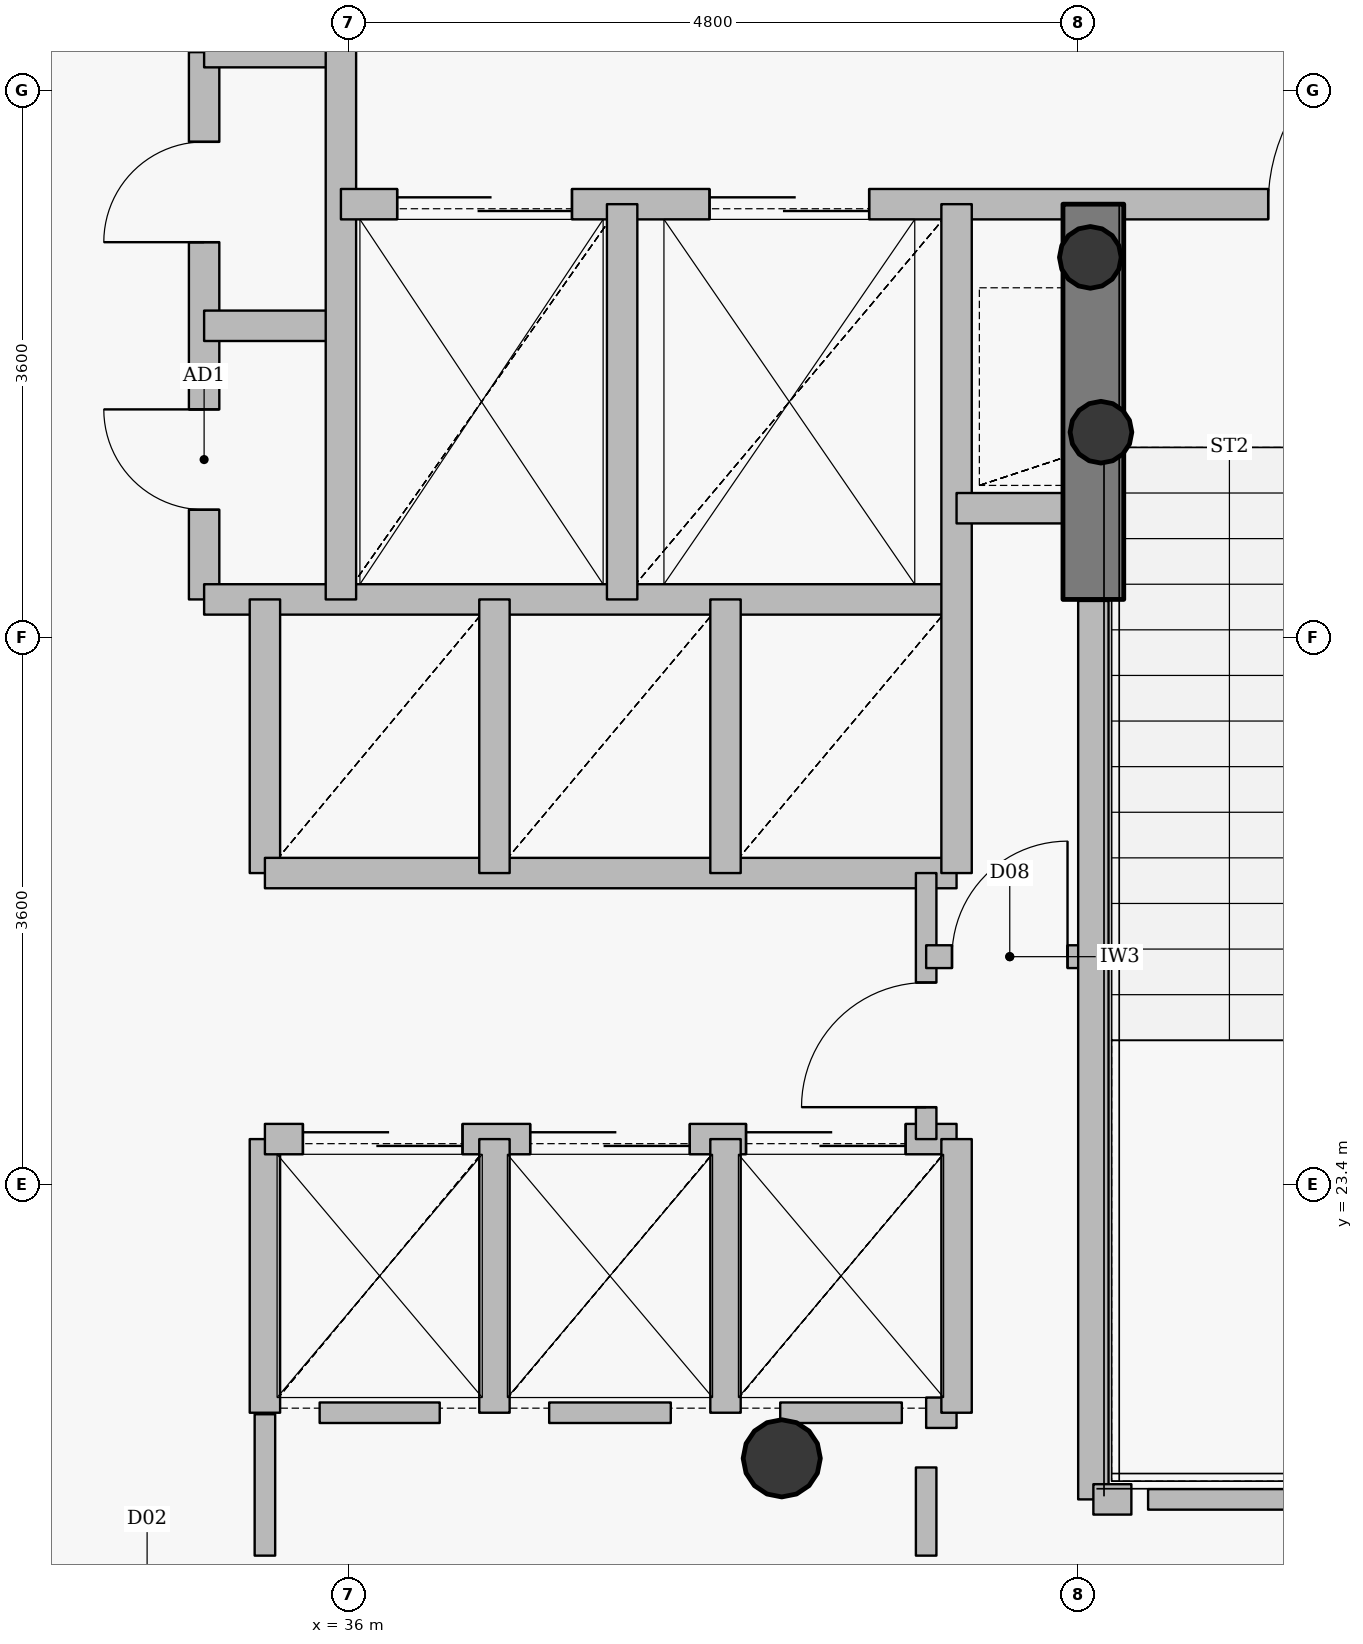
"""IFC4 building model, lengths in metres.
Left out: names, types, materials, properties, quantities, classifications, styles, units other than length and angle.
Written with IfcOpenShell. Run it as: python <this file> out.ifc"""

import sys

from ifc_helpers import new_model, si_unit, direction, frame, frame_2d, origin, origin_2d, place, context, subcontext, project, spatial, rectangle, hollow_circle, extrude, source, transform, mapped, element, fill, save


model = new_model("IFC4")
c1 = context("Model", 3, precision=1e-05, world=origin(), true_north=direction((0.0, 1.0)))
c2 = subcontext(c1, "Body", "Model", "MODEL_VIEW")
j1 = project(units=[si_unit("LENGTHUNIT", "METRE"), si_unit("PLANEANGLEUNIT", "RADIAN")], contexts=[c1])
p1 = place(None, origin())
s1 = spatial("IfcSite", under=j1, at=p1, CompositionType="ELEMENT")
p2 = place(p1, origin())
s2 = spatial("IfcBuilding", under=s1, at=p2, CompositionType="ELEMENT")
p3 = place(p2, frame((0.0, 0.0, 66.0)))
s3 = spatial("IfcBuildingStorey", under=s2, at=p3, CompositionType="ELEMENT", Elevation=66.0)
p4 = place(p3, frame((38.85, 21.6, 0.0), z_axis=(0.0, 0.0, 1.0), x_axis=(1.0, 0.0, 0.0)))
e1 = element("IfcColumn", 1, at=p4, inside=s3, PredefinedType="COLUMN", context=c2, shape_type="SweptSolid", body=[
    extrude(hollow_circle(Radius=0.254, WallThickness=0.02, at=origin_2d()), origin(), (0.0, 0.0, 1.0), 4.2),
])
for number, where, z_axis, x_axis in (
    (2, (40.95, 28.35, 0.0), (0.0, 0.0, 1.0), (1.0, 0.0, 0.0)),
    (3, (40.88, 29.5, 0.0), (0.0, 0.0, 1.0), (1.0, 0.0, 0.0)),
):
    element("IfcColumn", number, at=place(p3, frame(where, z_axis=z_axis, x_axis=x_axis)), inside=s3, PredefinedType="COLUMN", context=c2, shape_type="SweptSolid", body=[
        extrude(hollow_circle(Radius=0.203, WallThickness=0.016, at=origin_2d()), origin(), (0.0, 0.0, 1.0), 4.2),
    ])
p5 = place(p3, frame((40.9, 27.25, 0.0), z_axis=(0.0, 0.0, 1.0), x_axis=(0.0, 1.0, 0.0)))
e4 = element("IfcWall", 4, at=p5, inside=s3, PredefinedType="SHEAR", context=c2, shape_type="SweptSolid", body=[
    extrude(rectangle(XDim=2.6, YDim=0.4, at=frame_2d((1.3, 0.0))), origin(), (0.0, 0.0, 1.0), 3.55),
])
p6 = place(p3, frame((35.05, 27.25, 0.0), z_axis=(0.0, 0.0, 1.0), x_axis=(0.0, 1.0, 0.0)))
e5 = element("IfcWall", 5, at=p6, inside=s3, PredefinedType="PARTITIONING", context=c2, shape_type="SweptSolid", body=[
    extrude(rectangle(XDim=3.6, YDim=0.2, at=frame_2d((1.8, 0.0))), origin(), (0.0, 0.0, 1.0), 3.95),
])
p7 = place(p6, frame((0.59, 0.0, 0.0)))
e6 = element("IfcOpeningElement", 6, at=p7, cuts=e5, PredefinedType="OPENING", context=c2, shape_type="SweptSolid", body=[
    extrude(rectangle(XDim=0.66, YDim=2.05, at=origin_2d()), frame((0.33, 0.11, 1.025), z_axis=(0.0, -1.0, 0.0), x_axis=(1.0, 0.0, 0.0)), (0.0, 0.0, 1.0), 0.22),
])
p8 = place(p6, frame((2.35, 0.0, 0.0)))
e7 = element("IfcOpeningElement", 7, at=p8, cuts=e5, PredefinedType="OPENING", context=c2, shape_type="SweptSolid", body=[
    extrude(rectangle(XDim=0.66, YDim=2.05, at=origin_2d()), frame((0.33, 0.11, 1.025), z_axis=(0.0, -1.0, 0.0), x_axis=(1.0, 0.0, 0.0)), (0.0, 0.0, 1.0), 0.22),
])
p9 = place(p3, frame((35.05, 27.25, 0.0), z_axis=(0.0, 0.0, 1.0), x_axis=(1.0, 0.0, 0.0)))
e8 = element("IfcWall", 8, at=p9, inside=s3, PredefinedType="PARTITIONING", context=c2, shape_type="SweptSolid", body=[
    extrude(rectangle(XDim=4.95, YDim=0.2, at=frame_2d((2.475, 0.0))), origin(), (0.0, 0.0, 1.0), 3.535),
])
for number, where, z_axis, x_axis in (
    (9, (35.05, 29.05, 0.0), (0.0, 0.0, 1.0), (1.0, 0.0, 0.0)),
    (10, (35.05, 30.85, 0.0), (0.0, 0.0, 1.0), (1.0, 0.0, 0.0)),
):
    element("IfcWall", number, at=place(p3, frame(where, z_axis=z_axis, x_axis=x_axis)), inside=s3, PredefinedType="PARTITIONING", context=c2, shape_type="SweptSolid", body=[
        extrude(rectangle(XDim=0.9, YDim=0.2, at=frame_2d((0.45, 0.0))), origin(), (0.0, 0.0, 1.0), 3.95),
    ])
p10 = place(p3, frame((35.45, 21.9, 0.0), z_axis=(0.0, 0.0, 1.0), x_axis=(0.0, 1.0, 0.0)))
e11 = element("IfcWall", 11, at=p10, inside=s3, PredefinedType="PARTITIONING", context=c2, shape_type="SweptSolid", body=[
    extrude(rectangle(XDim=1.8, YDim=0.2, at=frame_2d((0.9, 0.0))), origin(), (0.0, 0.0, 1.0), 3.95),
])
p11 = place(p3, frame((35.45, 23.7, 0.0), z_axis=(0.0, 0.0, 1.0), x_axis=(1.0, 0.0, 0.0)))
e12 = element("IfcWall", 12, at=p11, inside=s3, PredefinedType="PARTITIONING", context=c2, shape_type="SweptSolid", body=[
    extrude(rectangle(XDim=4.55, YDim=0.2, at=frame_2d((2.275, 0.0))), origin(), (0.0, 0.0, 1.0), 3.535),
])
p12 = place(p11, frame((0.25, 0.0, 0.0)))
e13 = element("IfcOpeningElement", 13, at=p12, cuts=e12, PredefinedType="OPENING", context=c2, shape_type="SweptSolid", body=[
    extrude(rectangle(XDim=1.05, YDim=2.15, at=origin_2d()), frame((0.525, 0.11, 1.075), z_axis=(0.0, -1.0, 0.0), x_axis=(1.0, 0.0, 0.0)), (0.0, 0.0, 1.0), 0.22),
])
p13 = place(p11, frame((1.745, 0.0, 0.0)))
e14 = element("IfcOpeningElement", 14, at=p13, cuts=e12, PredefinedType="OPENING", context=c2, shape_type="SweptSolid", body=[
    extrude(rectangle(XDim=1.05, YDim=2.15, at=origin_2d()), frame((0.525, 0.11, 1.075), z_axis=(0.0, -1.0, 0.0), x_axis=(1.0, 0.0, 0.0)), (0.0, 0.0, 1.0), 0.22),
])
p14 = place(p11, frame((3.165, 0.0, 0.0)))
e15 = element("IfcOpeningElement", 15, at=p14, cuts=e12, PredefinedType="OPENING", context=c2, shape_type="SweptSolid", body=[
    extrude(rectangle(XDim=1.05, YDim=2.15, at=origin_2d()), frame((0.525, 0.11, 1.075), z_axis=(0.0, -1.0, 0.0), x_axis=(1.0, 0.0, 0.0)), (0.0, 0.0, 1.0), 0.22),
])
p15 = place(p3, frame((35.45, 25.45, 0.0), z_axis=(0.0, 0.0, 1.0), x_axis=(0.0, 1.0, 0.0)))
e16 = element("IfcWall", 16, at=p15, inside=s3, PredefinedType="PARTITIONING", context=c2, shape_type="SweptSolid", body=[
    extrude(rectangle(XDim=1.8, YDim=0.2, at=frame_2d((0.9, 0.0))), origin(), (0.0, 0.0, 1.0), 3.95),
])
p16 = place(p3, frame((35.45, 25.45, 0.0), z_axis=(0.0, 0.0, 1.0), x_axis=(1.0, 0.0, 0.0)))
e17 = element("IfcWall", 17, at=p16, inside=s3, PredefinedType="PARTITIONING", context=c2, shape_type="SweptSolid", body=[
    extrude(rectangle(XDim=4.55, YDim=0.2, at=frame_2d((2.275, 0.0))), origin(), (0.0, 0.0, 1.0), 3.535),
])
p17 = place(p3, frame((35.95, 27.25, 0.0), z_axis=(0.0, 0.0, 1.0), x_axis=(0.0, 1.0, 0.0)))
e18 = element("IfcWall", 18, at=p17, inside=s3, PredefinedType="PARTITIONING", context=c2, shape_type="SweptSolid", body=[
    extrude(rectangle(XDim=3.8, YDim=0.2, at=frame_2d((1.9, 0.0))), origin(), (0.0, 0.0, 1.0), 3.95),
])
p18 = place(p3, frame((35.95, 29.85, 0.0), z_axis=(0.0, 0.0, 1.0), x_axis=(1.0, 0.0, 0.0)))
e19 = element("IfcWall", 19, at=p18, inside=s3, PredefinedType="PARTITIONING", context=c2, shape_type="SweptSolid", body=[
    extrude(rectangle(XDim=8.49, YDim=0.2, at=frame_2d((4.245, 0.0))), origin(), (0.0, 0.0, 1.0), 3.535),
])
p19 = place(p18, frame((6.1, 0.0, 0.0)))
e20 = element("IfcOpeningElement", 20, at=p19, cuts=e19, PredefinedType="OPENING", context=c2, shape_type="SweptSolid", body=[
    extrude(rectangle(XDim=1.2, YDim=2.15, at=origin_2d()), frame((0.6, 0.11, 1.075), z_axis=(0.0, -1.0, 0.0), x_axis=(1.0, 0.0, 0.0)), (0.0, 0.0, 1.0), 0.22),
])
p20 = place(p18, frame((0.37, 0.0, 0.0)))
e21 = element("IfcOpeningElement", 21, at=p20, cuts=e19, PredefinedType="OPENING", context=c2, shape_type="SweptSolid", body=[
    extrude(rectangle(XDim=1.15, YDim=2.15, at=origin_2d()), frame((0.575, 0.11, 1.075), z_axis=(0.0, -1.0, 0.0), x_axis=(1.0, 0.0, 0.0)), (0.0, 0.0, 1.0), 0.22),
])
p21 = place(p18, frame((2.425, 0.0, 0.0)))
e22 = element("IfcOpeningElement", 22, at=p21, cuts=e19, PredefinedType="OPENING", context=c2, shape_type="SweptSolid", body=[
    extrude(rectangle(XDim=1.05, YDim=2.15, at=origin_2d()), frame((0.525, 0.11, 1.075), z_axis=(0.0, -1.0, 0.0), x_axis=(1.0, 0.0, 0.0)), (0.0, 0.0, 1.0), 0.22),
])
for number, where, z_axis, x_axis in (
    (23, (36.96, 21.9, 0.0), (0.0, 0.0, 1.0), (0.0, 1.0, 0.0)),
    (24, (36.96, 25.45, 0.0), (0.0, 0.0, 1.0), (0.0, 1.0, 0.0)),
):
    element("IfcWall", number, at=place(p3, frame(where, z_axis=z_axis, x_axis=x_axis)), inside=s3, PredefinedType="PARTITIONING", context=c2, shape_type="SweptSolid", body=[
        extrude(rectangle(XDim=1.8, YDim=0.2, at=frame_2d((0.9, 0.0))), origin(), (0.0, 0.0, 1.0), 3.95),
    ])
p22 = place(p3, frame((37.8, 27.25, 0.0), z_axis=(0.0, 0.0, 1.0), x_axis=(0.0, 1.0, 0.0)))
e25 = element("IfcWall", 25, at=p22, inside=s3, PredefinedType="PARTITIONING", context=c2, shape_type="SweptSolid", body=[
    extrude(rectangle(XDim=2.6, YDim=0.2, at=frame_2d((1.3, 0.0))), origin(), (0.0, 0.0, 1.0), 3.95),
])
for number, where, z_axis, x_axis in (
    (26, (38.48, 21.9, 0.0), (0.0, 0.0, 1.0), (0.0, 1.0, 0.0)),
    (27, (38.48, 25.45, 0.0), (0.0, 0.0, 1.0), (0.0, 1.0, 0.0)),
):
    element("IfcWall", number, at=place(p3, frame(where, z_axis=z_axis, x_axis=x_axis)), inside=s3, PredefinedType="PARTITIONING", context=c2, shape_type="SweptSolid", body=[
        extrude(rectangle(XDim=1.8, YDim=0.2, at=frame_2d((0.9, 0.0))), origin(), (0.0, 0.0, 1.0), 3.95),
    ])
p23 = place(p3, frame((39.8, 21.9, 0.0), z_axis=(0.0, 0.0, 1.0), x_axis=(1.0, 0.0, 0.0)))
e28 = element("IfcWall", 28, at=p23, inside=s3, PredefinedType="PARTITIONING", context=c2, shape_type="SweptSolid", body=[
    extrude(rectangle(XDim=0.2, YDim=0.2, at=frame_2d((0.1, 0.0))), origin(), (0.0, 0.0, 1.0), 3.95),
])
p24 = place(p3, frame((39.8, 23.7, 0.0), z_axis=(0.0, 0.0, 1.0), x_axis=(0.0, 1.0, 0.0)))
e29 = element("IfcWall", 29, at=p24, inside=s3, PredefinedType="PARTITIONING", context=c2, shape_type="SweptSolid", body=[
    extrude(rectangle(XDim=1.75, YDim=0.135, at=frame_2d((0.875, 0.0))), origin(), (0.0, 0.0, 1.0), 3.95),
])
p25 = place(p24, frame((0.21, 0.0, 0.0)))
e30 = element("IfcOpeningElement", 30, at=p25, cuts=e29, PredefinedType="OPENING", context=c2, shape_type="SweptSolid", body=[
    extrude(rectangle(XDim=0.82, YDim=2.1, at=origin_2d()), frame((0.41, 0.078, 1.05), z_axis=(0.0, -1.0, 0.0), x_axis=(1.0, 0.0, 0.0)), (0.0, 0.0, 1.0), 0.155),
])
p26 = place(p3, frame((39.8, 24.9, 0.0), z_axis=(0.0, 0.0, 1.0), x_axis=(1.0, 0.0, 0.0)))
e31 = element("IfcWall", 31, at=p26, inside=s3, PredefinedType="PARTITIONING", context=c2, shape_type="SweptSolid", body=[
    extrude(rectangle(XDim=1.1, YDim=0.15, at=frame_2d((0.55, 0.0))), origin(), (0.0, 0.0, 1.0), 3.95),
])
p27 = place(p26, frame((0.17, 0.0, 0.0)))
e32 = element("IfcOpeningElement", 32, at=p27, cuts=e31, PredefinedType="OPENING", context=c2, shape_type="SweptSolid", body=[
    extrude(rectangle(XDim=0.76, YDim=2.1, at=origin_2d()), frame((0.38, 0.085, 1.05), z_axis=(0.0, -1.0, 0.0), x_axis=(1.0, 0.0, 0.0)), (0.0, 0.0, 1.0), 0.17),
])
p28 = place(p3, frame((40.0, 21.9, 0.0), z_axis=(0.0, 0.0, 1.0), x_axis=(0.0, 1.0, 0.0)))
e33 = element("IfcWall", 33, at=p28, inside=s3, PredefinedType="PARTITIONING", context=c2, shape_type="SweptSolid", body=[
    extrude(rectangle(XDim=1.8, YDim=0.2, at=frame_2d((0.9, 0.0))), origin(), (0.0, 0.0, 1.0), 3.95),
])
p29 = place(p3, frame((40.0, 25.45, 0.0), z_axis=(0.0, 0.0, 1.0), x_axis=(0.0, 1.0, 0.0)))
e34 = element("IfcWall", 34, at=p29, inside=s3, PredefinedType="PARTITIONING", context=c2, shape_type="SweptSolid", body=[
    extrude(rectangle(XDim=4.4, YDim=0.2, at=frame_2d((2.2, 0.0))), origin(), (0.0, 0.0, 1.0), 3.95),
])
p30 = place(p3, frame((40.0, 27.85, 0.0), z_axis=(0.0, 0.0, 1.0), x_axis=(1.0, 0.0, 0.0)))
e35 = element("IfcWall", 35, at=p30, inside=s3, PredefinedType="PARTITIONING", context=c2, shape_type="SweptSolid", body=[
    extrude(rectangle(XDim=0.9, YDim=0.2, at=frame_2d((0.45, 0.0))), origin(), (0.0, 0.0, 1.0), 3.95),
])
p31 = place(p3, frame((40.9, 21.33, 0.0), z_axis=(0.0, 0.0, 1.0), x_axis=(0.0, 1.0, 0.0)))
e36 = element("IfcWall", 36, at=p31, inside=s3, PredefinedType="PARTITIONING", context=c2, shape_type="SweptSolid", body=[
    extrude(rectangle(XDim=5.91, YDim=0.2, at=frame_2d((2.955, 0.0))), origin(), (0.0, 0.0, 1.0), 3.485),
])
p32 = place(p3, frame((40.9, 21.33, 0.0), z_axis=(0.0, 0.0, 1.0), x_axis=(1.0, 0.0, 0.0)))
e37 = element("IfcWall", 37, at=p32, inside=s3, PredefinedType="PARTITIONING", context=c2, shape_type="SweptSolid", body=[
    extrude(rectangle(XDim=0.25, YDim=0.2, at=frame_2d((0.125, 0.0))), origin(), (0.0, 0.0, 1.0), 3.485),
])
p33 = place(p3, frame((44.08, 21.33, 0.0), z_axis=(0.0, 0.0, 1.0), x_axis=(-1.0, 0.0, 0.0)))
e38 = element("IfcWall", 38, at=p33, inside=s3, PredefinedType="PARTITIONING", context=c2, shape_type="SweptSolid", body=[
    extrude(rectangle(XDim=2.82, YDim=0.135, at=frame_2d((1.41, 0.0))), origin(), (0.0, 0.0, 1.0), 3.485),
])
p34 = place(p3, frame((36.6, 21.9, 0.0), z_axis=(0.0, 0.0, 1.0), x_axis=(-1.0, 0.0, 0.0)))
e39 = element("IfcWall", 39, at=p34, inside=s3, PredefinedType="PARTITIONING", context=c2, shape_type="SweptSolid", body=[
    extrude(rectangle(XDim=0.79, YDim=0.135, at=frame_2d((0.395, 0.0))), origin(), (0.0, 0.0, 1.0), 3.95),
])
p35 = place(p3, frame((38.12, 21.9, 0.0), z_axis=(0.0, 0.0, 1.0), x_axis=(-1.0, 0.0, 0.0)))
e40 = element("IfcWall", 40, at=p35, inside=s3, PredefinedType="PARTITIONING", context=c2, shape_type="SweptSolid", body=[
    extrude(rectangle(XDim=0.8, YDim=0.135, at=frame_2d((0.4, 0.0))), origin(), (0.0, 0.0, 1.0), 3.95),
])
p36 = place(p3, frame((39.64, 21.9, 0.0), z_axis=(0.0, 0.0, 1.0), x_axis=(-1.0, 0.0, 0.0)))
e41 = element("IfcWall", 41, at=p36, inside=s3, PredefinedType="PARTITIONING", context=c2, shape_type="SweptSolid", body=[
    extrude(rectangle(XDim=0.8, YDim=0.135, at=frame_2d((0.4, 0.0))), origin(), (0.0, 0.0, 1.0), 3.535),
])
p37 = place(p3, frame((39.8, 20.96, 0.0), z_axis=(0.0, 0.0, 1.0), x_axis=(0.0, 1.0, 0.0)))
e42 = element("IfcWall", 42, at=p37, inside=s3, PredefinedType="PARTITIONING", context=c2, shape_type="SweptSolid", body=[
    extrude(rectangle(XDim=0.58, YDim=0.135, at=frame_2d((0.29, 0.0))), origin(), (0.0, 0.0, 1.0), 3.485),
])
p38 = place(p3, frame((35.45, 21.89, 0.0), z_axis=(0.0, 0.0, 1.0), x_axis=(0.0, -1.0, 0.0)))
e43 = element("IfcWall", 43, at=p38, inside=s3, PredefinedType="PARTITIONING", context=c2, shape_type="SweptSolid", body=[
    extrude(rectangle(XDim=0.93, YDim=0.135, at=frame_2d((0.465, 0.0))), origin(), (0.0, 0.0, 1.0), 3.535),
])
m1 = source(origin(), c2, "Body", "SweptSolid", [
    extrude(rectangle(XDim=1.2, YDim=2.15, at=origin_2d()), frame((0.6, 0.025, 1.075), z_axis=(0.0, -1.0, 0.0), x_axis=(1.0, 0.0, 0.0)), (0.0, 0.0, 1.0), 0.05),
])
p39 = place(p19, origin())
e44 = element("IfcDoor", 44, at=p39, inside=s3, OperationType="SINGLE_SWING_RIGHT", PredefinedType="DOOR", context=c2, shape_type="MappedRepresentation", body=[
    mapped(m1, transform((0.0, 0.0, 0.0), x_axis=(1.0, 0.0, 0.0), y_axis=(0.0, 1.0, 0.0), z_axis=(0.0, 0.0, 1.0), scale=1.0)),
])
fill(e20, e44)
m2 = source(origin(), c2, "Body", "SweptSolid", [
    extrude(rectangle(XDim=1.15, YDim=2.15, at=origin_2d()), frame((0.575, 0.025, 1.075), z_axis=(0.0, -1.0, 0.0), x_axis=(1.0, 0.0, 0.0)), (0.0, 0.0, 1.0), 0.05),
])
p40 = place(p20, origin())
e45 = element("IfcDoor", 45, at=p40, inside=s3, OperationType="DOUBLE_DOOR_SLIDING", PredefinedType="USERDEFINED", context=c2, shape_type="MappedRepresentation", body=[
    mapped(m2, transform((0.0, 0.0, 0.0), x_axis=(1.0, 0.0, 0.0), y_axis=(0.0, 1.0, 0.0), z_axis=(0.0, 0.0, 1.0), scale=1.0)),
])
fill(e21, e45)
m3 = source(origin(), c2, "Body", "SweptSolid", [
    extrude(rectangle(XDim=1.05, YDim=2.15, at=origin_2d()), frame((0.525, 0.025, 1.075), z_axis=(0.0, -1.0, 0.0), x_axis=(1.0, 0.0, 0.0)), (0.0, 0.0, 1.0), 0.05),
])
p41 = place(p21, origin())
e46 = element("IfcDoor", 46, at=p41, inside=s3, OperationType="DOUBLE_DOOR_SLIDING", PredefinedType="USERDEFINED", context=c2, shape_type="MappedRepresentation", body=[
    mapped(m3, transform((0.0, 0.0, 0.0), x_axis=(1.0, 0.0, 0.0), y_axis=(0.0, 1.0, 0.0), z_axis=(0.0, 0.0, 1.0), scale=1.0)),
])
fill(e22, e46)
p42 = place(p12, origin())
e47 = element("IfcDoor", 47, at=p42, inside=s3, OperationType="DOUBLE_DOOR_SLIDING", PredefinedType="USERDEFINED", context=c2, shape_type="MappedRepresentation", body=[
    mapped(m3, transform((0.0, 0.0, 0.0), x_axis=(1.0, 0.0, 0.0), y_axis=(0.0, 1.0, 0.0), z_axis=(0.0, 0.0, 1.0), scale=1.0)),
])
fill(e13, e47)
p43 = place(p13, origin())
e48 = element("IfcDoor", 48, at=p43, inside=s3, OperationType="DOUBLE_DOOR_SLIDING", PredefinedType="USERDEFINED", context=c2, shape_type="MappedRepresentation", body=[
    mapped(m3, transform((0.0, 0.0, 0.0), x_axis=(1.0, 0.0, 0.0), y_axis=(0.0, 1.0, 0.0), z_axis=(0.0, 0.0, 1.0), scale=1.0)),
])
fill(e14, e48)
p44 = place(p14, origin())
e49 = element("IfcDoor", 49, at=p44, inside=s3, OperationType="DOUBLE_DOOR_SLIDING", PredefinedType="USERDEFINED", context=c2, shape_type="MappedRepresentation", body=[
    mapped(m3, transform((0.0, 0.0, 0.0), x_axis=(1.0, 0.0, 0.0), y_axis=(0.0, 1.0, 0.0), z_axis=(0.0, 0.0, 1.0), scale=1.0)),
])
fill(e15, e49)
m4 = source(origin(), c2, "Body", "SweptSolid", [
    extrude(rectangle(XDim=0.66, YDim=2.05, at=origin_2d()), frame((0.33, 0.025, 1.025), z_axis=(0.0, -1.0, 0.0), x_axis=(1.0, 0.0, 0.0)), (0.0, 0.0, 1.0), 0.05),
])
p45 = place(p7, origin())
e50 = element("IfcDoor", 50, at=p45, inside=s3, OperationType="SINGLE_SWING_RIGHT", PredefinedType="USERDEFINED", context=c2, shape_type="MappedRepresentation", body=[
    mapped(m4, transform((0.0, 0.0, 0.0), x_axis=(1.0, 0.0, 0.0), y_axis=(0.0, 1.0, 0.0), z_axis=(0.0, 0.0, 1.0), scale=1.0)),
])
fill(e6, e50)
p46 = place(p8, origin())
e51 = element("IfcDoor", 51, at=p46, inside=s3, OperationType="SINGLE_SWING_LEFT", PredefinedType="USERDEFINED", context=c2, shape_type="MappedRepresentation", body=[
    mapped(m4, transform((0.0, 0.0, 0.0), x_axis=(1.0, 0.0, 0.0), y_axis=(0.0, 1.0, 0.0), z_axis=(0.0, 0.0, 1.0), scale=1.0)),
])
fill(e7, e51)
m5 = source(origin(), c2, "Body", "SweptSolid", [
    extrude(rectangle(XDim=0.82, YDim=2.1, at=origin_2d()), frame((0.41, 0.025, 1.05), z_axis=(0.0, -1.0, 0.0), x_axis=(1.0, 0.0, 0.0)), (0.0, 0.0, 1.0), 0.05),
])
p47 = place(p25, origin())
e52 = element("IfcDoor", 52, at=p47, inside=s3, OperationType="SINGLE_SWING_LEFT", PredefinedType="DOOR", context=c2, shape_type="MappedRepresentation", body=[
    mapped(m5, transform((0.0, 0.0, 0.0), x_axis=(1.0, 0.0, 0.0), y_axis=(0.0, 1.0, 0.0), z_axis=(0.0, 0.0, 1.0), scale=1.0)),
])
fill(e30, e52)
m6 = source(origin(), c2, "Body", "SweptSolid", [
    extrude(rectangle(XDim=0.76, YDim=2.1, at=origin_2d()), frame((0.38, 0.025, 1.05), z_axis=(0.0, -1.0, 0.0), x_axis=(1.0, 0.0, 0.0)), (0.0, 0.0, 1.0), 0.05),
])
p48 = place(p27, origin())
e53 = element("IfcDoor", 53, at=p48, inside=s3, OperationType="SINGLE_SWING_RIGHT", PredefinedType="DOOR", context=c2, shape_type="MappedRepresentation", body=[
    mapped(m6, transform((0.0, 0.0, 0.0), x_axis=(1.0, 0.0, 0.0), y_axis=(0.0, 1.0, 0.0), z_axis=(0.0, 0.0, 1.0), scale=1.0)),
])
fill(e32, e53)
save(model, sys.argv[1])
